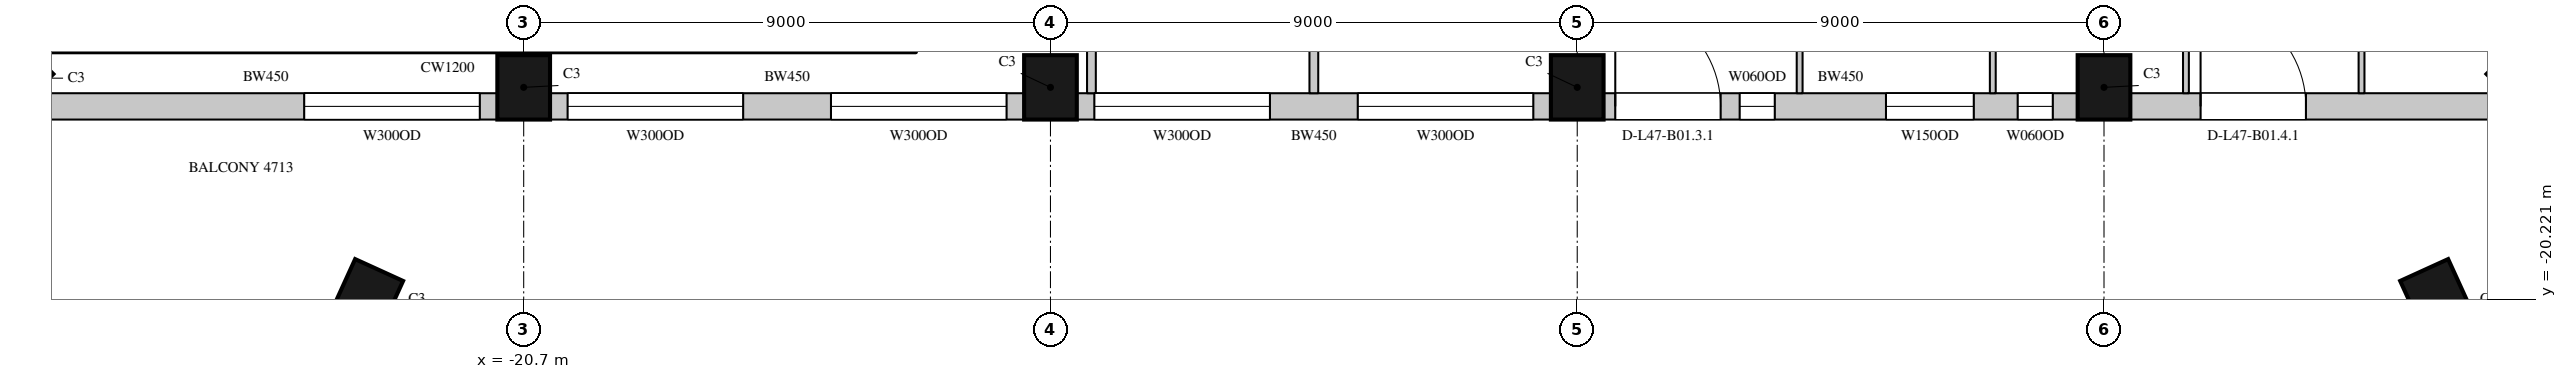
"""IFC4 building model, lengths in metres.
Left out: names, types, materials, properties, quantities, classifications, styles, units other than length and angle.
Written with IfcOpenShell. Run it as: python <this file> out.ifc"""

import sys

from ifc_helpers import new_model, si_unit, direction, frame, frame_2d, origin, origin_2d, place, context, subcontext, project, spatial, rectangle, extrude, element, fill, save


model = new_model("IFC4")
c1 = context("Model", 3, precision=1e-05, world=origin(), true_north=direction((0.0, 1.0)))
c2 = subcontext(c1, "Body", "Model", "MODEL_VIEW")
j1 = project(units=[si_unit("LENGTHUNIT", "METRE"), si_unit("PLANEANGLEUNIT", "RADIAN")], contexts=[c1])
p1 = place(None, origin())
s1 = spatial("IfcSite", under=j1, at=p1, CompositionType="ELEMENT")
p2 = place(p1, origin())
s2 = spatial("IfcBuilding", under=s1, at=p2, CompositionType="ELEMENT")
p3 = place(p2, frame((0.0, 0.0, 213.8)))
s3 = spatial("IfcBuildingStorey", under=s2, at=p3, CompositionType="ELEMENT", Elevation=213.8)
for number, where, z_axis, x_axis in (
    (1, (-29.443, -16.443, 0.0), (0.0, 0.0, 1.0), (0.707, -0.707, 0.0)),
    (2, (-20.7, -16.6, 0.0), (0.0, 0.0, 1.0), (1.0, 0.0, 0.0)),
    (3, (-11.7, -16.6, 0.0), (0.0, 0.0, 1.0), (1.0, 0.0, 0.0)),
    (4, (-2.7, -16.6, 0.0), (0.0, 0.0, 1.0), (1.0, 0.0, 0.0)),
    (5, (6.3, -16.6, 0.0), (0.0, 0.0, 1.0), (1.0, 0.0, 0.0)),
    (6, (13.543, -16.443, 0.0), (0.0, 0.0, 1.0), (0.707, 0.707, 0.0)),
    (7, (-23.398, -20.221, 0.0), (0.0, 0.0, 1.0), (0.91, -0.415, 0.0)),
    (8, (11.998, -20.221, 0.0), (0.0, 0.0, 1.0), (0.91, 0.415, 0.0)),
):
    element("IfcColumn", number, at=place(p3, frame(where, z_axis=z_axis, x_axis=x_axis)), inside=s3, PredefinedType="COLUMN", context=c2, shape_type="SweptSolid", body=[
        extrude(rectangle(XDim=0.9, YDim=1.1, at=origin_2d()), origin(), (0.0, 0.0, 1.0), 4.1),
    ])
p4 = place(p3, frame((-29.064, -16.925, 0.0), z_axis=(0.0, 0.0, 1.0), x_axis=(1.0, 0.0, 0.0)))
e9 = element("IfcWall", 9, at=p4, inside=s3, PredefinedType="SOLIDWALL", context=c2, shape_type="SweptSolid", body=[
    extrude(rectangle(XDim=7.914, YDim=0.45, at=frame_2d((3.957, 0.0))), origin(), (0.0, 0.0, 1.0), 3.8),
])
p5 = place(p4, frame((4.614, 0.0, 1.05)))
e10 = element("IfcOpeningElement", 10, at=p5, cuts=e9, PredefinedType="OPENING", context=c2, shape_type="SweptSolid", body=[
    extrude(rectangle(XDim=3.0, YDim=2.4, at=frame_2d((1.5, 1.2))), frame((0.0, 0.235, 0.0), z_axis=(0.0, -1.0, 0.0), x_axis=(1.0, 0.0, 0.0)), (0.0, 0.0, 1.0), 0.47),
])
p6 = place(p3, frame((-20.25, -16.925, 0.0), z_axis=(0.0, 0.0, 1.0), x_axis=(1.0, 0.0, 0.0)))
e11 = element("IfcWall", 11, at=p6, inside=s3, PredefinedType="SOLIDWALL", context=c2, shape_type="SweptSolid", body=[
    extrude(rectangle(XDim=8.1, YDim=0.45, at=frame_2d((4.05, 0.0))), origin(), (0.0, 0.0, 1.0), 3.8),
])
p7 = place(p6, frame((0.3, 0.0, 1.05)))
e12 = element("IfcOpeningElement", 12, at=p7, cuts=e11, PredefinedType="OPENING", context=c2, shape_type="SweptSolid", body=[
    extrude(rectangle(XDim=3.0, YDim=2.4, at=frame_2d((1.5, 1.2))), frame((0.0, 0.235, 0.0), z_axis=(0.0, -1.0, 0.0), x_axis=(1.0, 0.0, 0.0)), (0.0, 0.0, 1.0), 0.47),
])
p8 = place(p6, frame((4.8, 0.0, 1.05)))
e13 = element("IfcOpeningElement", 13, at=p8, cuts=e11, PredefinedType="OPENING", context=c2, shape_type="SweptSolid", body=[
    extrude(rectangle(XDim=3.0, YDim=2.4, at=frame_2d((1.5, 1.2))), frame((0.0, 0.235, 0.0), z_axis=(0.0, -1.0, 0.0), x_axis=(1.0, 0.0, 0.0)), (0.0, 0.0, 1.0), 0.47),
])
p9 = place(p3, frame((-11.25, -16.925, 0.0), z_axis=(0.0, 0.0, 1.0), x_axis=(1.0, 0.0, 0.0)))
e14 = element("IfcWall", 14, at=p9, inside=s3, PredefinedType="SOLIDWALL", context=c2, shape_type="SweptSolid", body=[
    extrude(rectangle(XDim=8.1, YDim=0.45, at=frame_2d((4.05, 0.0))), origin(), (0.0, 0.0, 1.0), 3.8),
])
p10 = place(p9, frame((0.3, 0.0, 1.05)))
e15 = element("IfcOpeningElement", 15, at=p10, cuts=e14, PredefinedType="OPENING", context=c2, shape_type="SweptSolid", body=[
    extrude(rectangle(XDim=3.0, YDim=2.4, at=frame_2d((1.5, 1.2))), frame((0.0, 0.235, 0.0), z_axis=(0.0, -1.0, 0.0), x_axis=(1.0, 0.0, 0.0)), (0.0, 0.0, 1.0), 0.47),
])
p11 = place(p9, frame((4.8, 0.0, 1.05)))
e16 = element("IfcOpeningElement", 16, at=p11, cuts=e14, PredefinedType="OPENING", context=c2, shape_type="SweptSolid", body=[
    extrude(rectangle(XDim=3.0, YDim=2.4, at=frame_2d((1.5, 1.2))), frame((0.0, 0.235, 0.0), z_axis=(0.0, -1.0, 0.0), x_axis=(1.0, 0.0, 0.0)), (0.0, 0.0, 1.0), 0.47),
])
p12 = place(p3, frame((-2.25, -16.925, 0.0), z_axis=(0.0, 0.0, 1.0), x_axis=(1.0, 0.0, 0.0)))
e17 = element("IfcWall", 17, at=p12, inside=s3, PredefinedType="SOLIDWALL", context=c2, shape_type="SweptSolid", body=[
    extrude(rectangle(XDim=8.1, YDim=0.45, at=frame_2d((4.05, 0.0))), origin(), (0.0, 0.0, 1.0), 3.8),
])
p13 = place(p12, frame((0.2, 0.0, 0.0)))
e18 = element("IfcOpeningElement", 18, at=p13, cuts=e17, PredefinedType="OPENING", context=c2, shape_type="SweptSolid", body=[
    extrude(rectangle(XDim=1.8, YDim=2.4, at=frame_2d((0.9, 1.2))), frame((0.0, 0.235, 0.0), z_axis=(0.0, -1.0, 0.0), x_axis=(1.0, 0.0, 0.0)), (0.0, 0.0, 1.0), 0.47),
])
p14 = place(p12, frame((2.325, 0.0, 1.05)))
e19 = element("IfcOpeningElement", 19, at=p14, cuts=e17, PredefinedType="OPENING", context=c2, shape_type="SweptSolid", body=[
    extrude(rectangle(XDim=0.6, YDim=2.4, at=frame_2d((0.3, 1.2))), frame((0.0, 0.235, 0.0), z_axis=(0.0, -1.0, 0.0), x_axis=(1.0, 0.0, 0.0)), (0.0, 0.0, 1.0), 0.47),
])
p15 = place(p12, frame((4.825, 0.0, 1.05)))
e20 = element("IfcOpeningElement", 20, at=p15, cuts=e17, PredefinedType="OPENING", context=c2, shape_type="SweptSolid", body=[
    extrude(rectangle(XDim=1.5, YDim=2.4, at=frame_2d((0.75, 1.2))), frame((0.0, 0.235, 0.0), z_axis=(0.0, -1.0, 0.0), x_axis=(1.0, 0.0, 0.0)), (0.0, 0.0, 1.0), 0.47),
])
p16 = place(p12, frame((7.075, 0.0, 1.05)))
e21 = element("IfcOpeningElement", 21, at=p16, cuts=e17, PredefinedType="OPENING", context=c2, shape_type="SweptSolid", body=[
    extrude(rectangle(XDim=0.6, YDim=2.4, at=frame_2d((0.3, 1.2))), frame((0.0, 0.235, 0.0), z_axis=(0.0, -1.0, 0.0), x_axis=(1.0, 0.0, 0.0)), (0.0, 0.0, 1.0), 0.47),
])
p17 = place(p3, frame((6.75, -16.925, 0.0), z_axis=(0.0, 0.0, 1.0), x_axis=(1.0, 0.0, 0.0)))
e22 = element("IfcWall", 22, at=p17, inside=s3, PredefinedType="SOLIDWALL", context=c2, shape_type="SweptSolid", body=[
    extrude(rectangle(XDim=6.414, YDim=0.45, at=frame_2d((3.207, 0.0))), origin(), (0.0, 0.0, 1.0), 3.8),
])
p18 = place(p17, frame((1.2, 0.0, 0.0)))
e23 = element("IfcOpeningElement", 23, at=p18, cuts=e22, PredefinedType="OPENING", context=c2, shape_type="SweptSolid", body=[
    extrude(rectangle(XDim=1.8, YDim=2.4, at=frame_2d((0.9, 1.2))), frame((0.0, 0.235, 0.0), z_axis=(0.0, -1.0, 0.0), x_axis=(1.0, 0.0, 0.0)), (0.0, 0.0, 1.0), 0.47),
])
for number, where, z_axis, x_axis in (
    (24, (-23.69, -18.0, 0.0), (0.0, 0.0, 1.0), (1.0, 0.0, 0.0)),
    (25, (-7.85, -18.0, 0.0), (0.0, 0.0, 1.0), (1.0, 0.0, 0.0)),
):
    element("IfcWall", number, at=place(p3, frame(where, z_axis=z_axis, x_axis=x_axis)), inside=s3, PredefinedType="SOLIDWALL", context=c2, shape_type="SweptSolid", body=[
        extrude(rectangle(XDim=3.76, YDim=0.45, at=frame_2d((1.88, 0.0))), origin(), (0.0, 0.0, 1.0), 0.6),
    ])
p19 = place(p3, frame((-11.0, -16.7, 0.0), z_axis=(0.0, 0.0, 1.0), x_axis=(0.0, 1.0, 0.0)))
e26 = element("IfcWall", 26, at=p19, inside=s3, PredefinedType="PARTITIONING", context=c2, shape_type="SweptSolid", body=[
    extrude(rectangle(XDim=1.88, YDim=0.15, at=frame_2d((0.94, 0.0))), origin(), (0.0, 0.0, 1.0), 3.8),
])
p20 = place(p3, frame((-7.2, -16.7, 0.0), z_axis=(0.0, 0.0, 1.0), x_axis=(0.0, 1.0, 0.0)))
e27 = element("IfcWall", 27, at=p20, inside=s3, PredefinedType="PARTITIONING", context=c2, shape_type="SweptSolid", body=[
    extrude(rectangle(XDim=4.9, YDim=0.15, at=frame_2d((2.45, 0.0))), origin(), (0.0, 0.0, 1.0), 3.15),
])
for number, where, z_axis, x_axis in (
    (28, (1.1, -16.7, 0.0), (0.0, 0.0, 1.0), (0.0, 1.0, 0.0)),
    (29, (4.4, -16.7, 0.0), (0.0, 0.0, 1.0), (0.0, 1.0, 0.0)),
    (30, (7.7, -16.7, 0.0), (0.0, 0.0, 1.0), (0.0, 1.0, 0.0)),
):
    element("IfcWall", number, at=place(p3, frame(where, z_axis=z_axis, x_axis=x_axis)), inside=s3, PredefinedType="PARTITIONING", context=c2, shape_type="SweptSolid", body=[
        extrude(rectangle(XDim=4.9, YDim=0.1, at=frame_2d((2.45, 0.0))), origin(), (0.0, 0.0, 1.0), 3.8),
    ])
p21 = place(p3, frame((10.7, -16.7, 0.0), z_axis=(0.0, 0.0, 1.0), x_axis=(0.0, 1.0, 0.0)))
e31 = element("IfcWall", 31, at=p21, inside=s3, PredefinedType="PARTITIONING", context=c2, shape_type="SweptSolid", body=[
    extrude(rectangle(XDim=5.0, YDim=0.1, at=frame_2d((2.5, 0.0))), origin(), (0.0, 0.0, 1.0), 3.8),
])
p22 = place(p5, origin())
e32 = element("IfcWindow", 32, at=p22, inside=s3, PartitioningType="SINGLE_PANEL", PredefinedType="WINDOW", context=c2, shape_type="SweptSolid", body=[
    extrude(rectangle(XDim=3.0, YDim=2.4, at=frame_2d((1.5, 1.2))), frame((0.0, 0.135, 0.0), z_axis=(0.0, -1.0, 0.0), x_axis=(1.0, 0.0, 0.0)), (0.0, 0.0, 1.0), 0.06),
])
fill(e10, e32)
p23 = place(p7, origin())
e33 = element("IfcWindow", 33, at=p23, inside=s3, PartitioningType="SINGLE_PANEL", PredefinedType="WINDOW", context=c2, shape_type="SweptSolid", body=[
    extrude(rectangle(XDim=3.0, YDim=2.4, at=frame_2d((1.5, 1.2))), frame((0.0, 0.135, 0.0), z_axis=(0.0, -1.0, 0.0), x_axis=(1.0, 0.0, 0.0)), (0.0, 0.0, 1.0), 0.06),
])
fill(e12, e33)
p24 = place(p8, origin())
e34 = element("IfcWindow", 34, at=p24, inside=s3, PartitioningType="SINGLE_PANEL", PredefinedType="WINDOW", context=c2, shape_type="SweptSolid", body=[
    extrude(rectangle(XDim=3.0, YDim=2.4, at=frame_2d((1.5, 1.2))), frame((0.0, 0.135, 0.0), z_axis=(0.0, -1.0, 0.0), x_axis=(1.0, 0.0, 0.0)), (0.0, 0.0, 1.0), 0.06),
])
fill(e13, e34)
p25 = place(p10, origin())
e35 = element("IfcWindow", 35, at=p25, inside=s3, PartitioningType="SINGLE_PANEL", PredefinedType="WINDOW", context=c2, shape_type="SweptSolid", body=[
    extrude(rectangle(XDim=3.0, YDim=2.4, at=frame_2d((1.5, 1.2))), frame((0.0, 0.135, 0.0), z_axis=(0.0, -1.0, 0.0), x_axis=(1.0, 0.0, 0.0)), (0.0, 0.0, 1.0), 0.06),
])
fill(e15, e35)
p26 = place(p11, origin())
e36 = element("IfcWindow", 36, at=p26, inside=s3, PartitioningType="SINGLE_PANEL", PredefinedType="WINDOW", context=c2, shape_type="SweptSolid", body=[
    extrude(rectangle(XDim=3.0, YDim=2.4, at=frame_2d((1.5, 1.2))), frame((0.0, 0.135, 0.0), z_axis=(0.0, -1.0, 0.0), x_axis=(1.0, 0.0, 0.0)), (0.0, 0.0, 1.0), 0.06),
])
fill(e16, e36)
p27 = place(p13, origin())
e37 = element("IfcDoor", 37, at=p27, inside=s3, OperationType="SLIDING_TO_LEFT", PredefinedType="DOOR", context=c2, shape_type="SweptSolid", body=[
    extrude(rectangle(XDim=1.8, YDim=2.4, at=frame_2d((0.9, 1.2))), frame((0.0, 0.13, 0.0), z_axis=(0.0, -1.0, 0.0), x_axis=(1.0, 0.0, 0.0)), (0.0, 0.0, 1.0), 0.05),
])
fill(e18, e37)
p28 = place(p18, origin())
e38 = element("IfcDoor", 38, at=p28, inside=s3, OperationType="SLIDING_TO_LEFT", PredefinedType="DOOR", context=c2, shape_type="SweptSolid", body=[
    extrude(rectangle(XDim=1.8, YDim=2.4, at=frame_2d((0.9, 1.2))), frame((0.0, 0.13, 0.0), z_axis=(0.0, -1.0, 0.0), x_axis=(1.0, 0.0, 0.0)), (0.0, 0.0, 1.0), 0.05),
])
fill(e23, e38)
p29 = place(p14, origin())
e39 = element("IfcWindow", 39, at=p29, inside=s3, PartitioningType="SINGLE_PANEL", PredefinedType="WINDOW", context=c2, shape_type="SweptSolid", body=[
    extrude(rectangle(XDim=0.6, YDim=2.4, at=frame_2d((0.3, 1.2))), frame((0.0, 0.135, 0.0), z_axis=(0.0, -1.0, 0.0), x_axis=(1.0, 0.0, 0.0)), (0.0, 0.0, 1.0), 0.06),
])
fill(e19, e39)
p30 = place(p15, origin())
e40 = element("IfcWindow", 40, at=p30, inside=s3, PartitioningType="SINGLE_PANEL", PredefinedType="WINDOW", context=c2, shape_type="SweptSolid", body=[
    extrude(rectangle(XDim=1.5, YDim=2.4, at=frame_2d((0.75, 1.2))), frame((0.0, 0.135, 0.0), z_axis=(0.0, -1.0, 0.0), x_axis=(1.0, 0.0, 0.0)), (0.0, 0.0, 1.0), 0.06),
])
fill(e20, e40)
p31 = place(p16, origin())
e41 = element("IfcWindow", 41, at=p31, inside=s3, PartitioningType="SINGLE_PANEL", PredefinedType="WINDOW", context=c2, shape_type="SweptSolid", body=[
    extrude(rectangle(XDim=0.6, YDim=2.4, at=frame_2d((0.3, 1.2))), frame((0.0, 0.135, 0.0), z_axis=(0.0, -1.0, 0.0), x_axis=(1.0, 0.0, 0.0)), (0.0, 0.0, 1.0), 0.06),
])
fill(e21, e41)
save(model, sys.argv[1])
